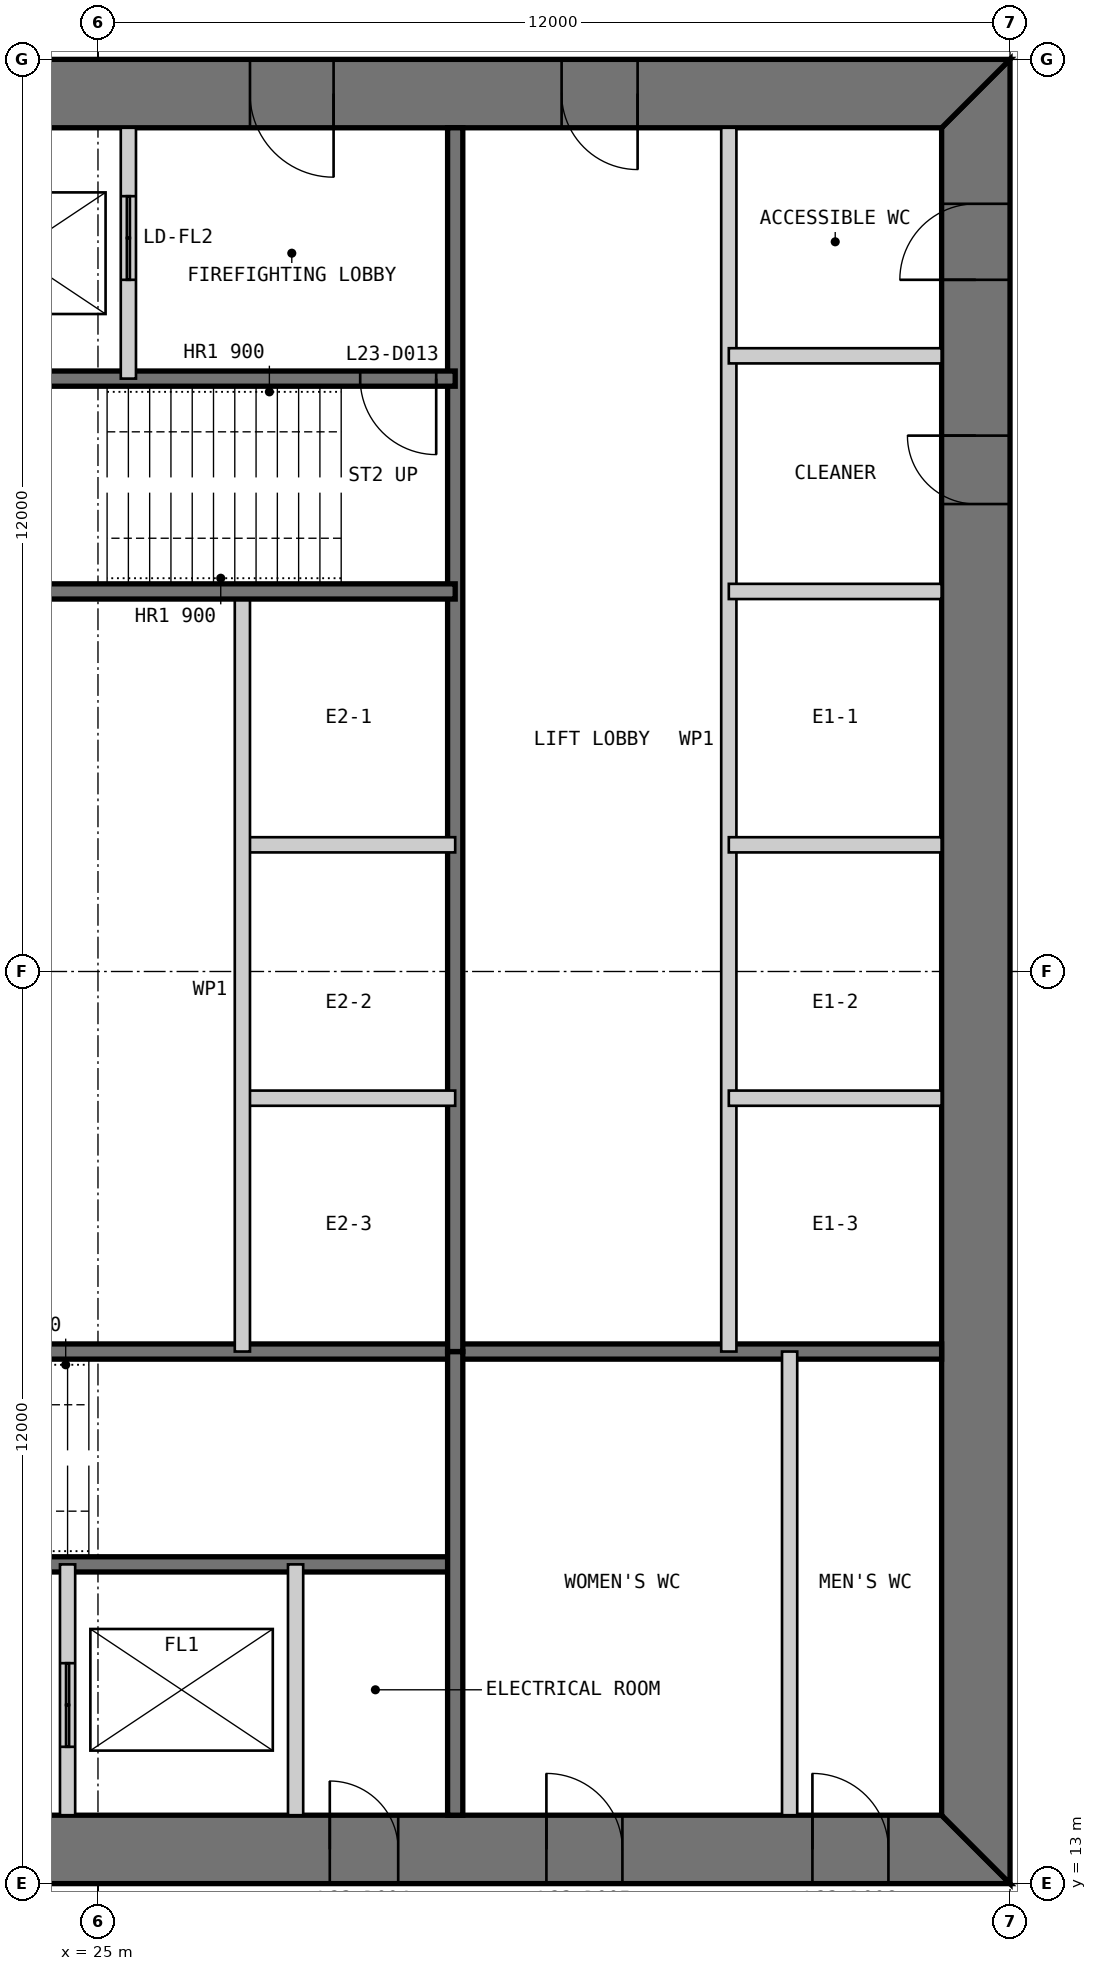
"""IFC4 building model, lengths in metres.
Left out: names, types, materials, properties, quantities, classifications, styles, units other than length and angle.
Written with IfcOpenShell. Run it as: python <this file> out.ifc"""

import sys

from ifc_helpers import new_model, si_unit, direction, frame, frame_2d, origin, place, context, subcontext, project, spatial, polyline, rectangle, outline, extrude, element, fill, save


model = new_model("IFC4")
c1 = context("Model", 3, precision=1e-05, world=origin(), true_north=direction((0.0, 1.0)))
c2 = subcontext(c1, "Body", "Model", "MODEL_VIEW")
j1 = project(units=[si_unit("LENGTHUNIT", "METRE"), si_unit("PLANEANGLEUNIT", "RADIAN")], contexts=[c1])
p1 = place(None, origin())
s1 = spatial("IfcSite", under=j1, at=p1, CompositionType="ELEMENT")
p2 = place(p1, origin())
s2 = spatial("IfcBuilding", under=s1, at=p2, CompositionType="ELEMENT")
p3 = place(p2, frame((0.0, 0.0, 102.4)))
s3 = spatial("IfcBuildingStorey", under=s2, at=p3, CompositionType="ELEMENT", Elevation=102.4)
p4 = place(p3, frame((13.0, 13.45, 0.0), z_axis=(0.0, 0.0, 1.0), x_axis=(1.0, 0.0, 0.0)))
e1 = element("IfcWall", 1, at=p4, inside=s3, PredefinedType="SHEAR", context=c2, shape_type="SweptSolid", body=[
    extrude(outline(polyline([(0.0, -0.45), (24.0, -0.45), (23.1, 0.45), (0.9, 0.45), (0.0, -0.45)])), origin(), (0.0, 0.0, 1.0), 4.0),
])
p5 = place(p4, frame((4.9, 0.0, 0.0)))
e2 = element("IfcOpeningElement", 2, at=p5, cuts=e1, PredefinedType="OPENING", context=c2, shape_type="SweptSolid", body=[
    extrude(rectangle(XDim=1.0, YDim=2.2, at=frame_2d((0.5, 1.1))), frame((0.0, 0.46, 0.0), z_axis=(0.0, -1.0, 0.0), x_axis=(1.0, 0.0, 0.0)), (0.0, 0.0, 1.0), 0.92),
])
p6 = place(p4, frame((8.9, 0.0, 0.0)))
e3 = element("IfcOpeningElement", 3, at=p6, cuts=e1, PredefinedType="OPENING", context=c2, shape_type="SweptSolid", body=[
    extrude(rectangle(XDim=1.1, YDim=2.2, at=frame_2d((0.55, 1.1))), frame((0.0, 0.46, 0.0), z_axis=(0.0, -1.0, 0.0), x_axis=(1.0, 0.0, 0.0)), (0.0, 0.0, 1.0), 0.92),
])
p7 = place(p4, frame((15.05, 0.0, 0.0)))
e4 = element("IfcOpeningElement", 4, at=p7, cuts=e1, PredefinedType="OPENING", context=c2, shape_type="SweptSolid", body=[
    extrude(rectangle(XDim=0.9, YDim=2.2, at=frame_2d((0.45, 1.1))), frame((0.0, 0.46, 0.0), z_axis=(0.0, -1.0, 0.0), x_axis=(1.0, 0.0, 0.0)), (0.0, 0.0, 1.0), 0.92),
])
p8 = place(p4, frame((17.9, 0.0, 0.0)))
e5 = element("IfcOpeningElement", 5, at=p8, cuts=e1, PredefinedType="OPENING", context=c2, shape_type="SweptSolid", body=[
    extrude(rectangle(XDim=1.0, YDim=2.2, at=frame_2d((0.5, 1.1))), frame((0.0, 0.46, 0.0), z_axis=(0.0, -1.0, 0.0), x_axis=(1.0, 0.0, 0.0)), (0.0, 0.0, 1.0), 0.92),
])
p9 = place(p4, frame((21.4, 0.0, 0.0)))
e6 = element("IfcOpeningElement", 6, at=p9, cuts=e1, PredefinedType="OPENING", context=c2, shape_type="SweptSolid", body=[
    extrude(rectangle(XDim=1.0, YDim=2.2, at=frame_2d((0.5, 1.1))), frame((0.0, 0.46, 0.0), z_axis=(0.0, -1.0, 0.0), x_axis=(1.0, 0.0, 0.0)), (0.0, 0.0, 1.0), 0.92),
])
p10 = place(p3, frame((36.55, 13.9, 0.0), z_axis=(0.0, 0.0, 1.0), x_axis=(0.0, 1.0, 0.0)))
e7 = element("IfcWall", 7, at=p10, inside=s3, PredefinedType="SHEAR", context=c2, shape_type="SweptSolid", body=[
    extrude(outline(polyline([(-0.9, -0.45), (23.1, -0.45), (22.2, 0.45), (0.0, 0.45), (-0.9, -0.45)])), origin(), (0.0, 0.0, 1.0), 4.0),
])
p11 = place(p10, frame((20.2, 0.0, 0.0)))
e8 = element("IfcOpeningElement", 8, at=p11, cuts=e7, PredefinedType="OPENING", context=c2, shape_type="SweptSolid", body=[
    extrude(rectangle(XDim=1.0, YDim=2.2, at=frame_2d((0.5, 1.1))), frame((0.0, 0.46, 0.0), z_axis=(0.0, -1.0, 0.0), x_axis=(1.0, 0.0, 0.0)), (0.0, 0.0, 1.0), 0.92),
])
p12 = place(p10, frame((17.25, 0.0, 0.0)))
e9 = element("IfcOpeningElement", 9, at=p12, cuts=e7, PredefinedType="OPENING", context=c2, shape_type="SweptSolid", body=[
    extrude(rectangle(XDim=0.9, YDim=2.2, at=frame_2d((0.45, 1.1))), frame((0.0, 0.46, 0.0), z_axis=(0.0, -1.0, 0.0), x_axis=(1.0, 0.0, 0.0)), (0.0, 0.0, 1.0), 0.92),
])
p13 = place(p3, frame((37.0, 36.55, 0.0), z_axis=(0.0, 0.0, 1.0), x_axis=(-1.0, 0.0, 0.0)))
e10 = element("IfcWall", 10, at=p13, inside=s3, PredefinedType="SHEAR", context=c2, shape_type="SweptSolid", body=[
    extrude(outline(polyline([(0.0, -0.45), (24.0, -0.45), (23.1, 0.45), (0.9, 0.45), (0.0, -0.45)])), origin(), (0.0, 0.0, 1.0), 4.0),
])
p14 = place(p13, frame((4.9, 0.0, 0.0)))
e11 = element("IfcOpeningElement", 11, at=p14, cuts=e10, PredefinedType="OPENING", context=c2, shape_type="SweptSolid", body=[
    extrude(rectangle(XDim=1.0, YDim=2.2, at=frame_2d((0.5, 1.1))), frame((0.0, 0.46, 0.0), z_axis=(0.0, -1.0, 0.0), x_axis=(1.0, 0.0, 0.0)), (0.0, 0.0, 1.0), 0.92),
])
p15 = place(p13, frame((8.9, 0.0, 0.0)))
e12 = element("IfcOpeningElement", 12, at=p15, cuts=e10, PredefinedType="OPENING", context=c2, shape_type="SweptSolid", body=[
    extrude(rectangle(XDim=1.1, YDim=2.2, at=frame_2d((0.55, 1.1))), frame((0.0, 0.46, 0.0), z_axis=(0.0, -1.0, 0.0), x_axis=(1.0, 0.0, 0.0)), (0.0, 0.0, 1.0), 0.92),
])
p16 = place(p13, frame((15.05, 0.0, 0.0)))
e13 = element("IfcOpeningElement", 13, at=p16, cuts=e10, PredefinedType="OPENING", context=c2, shape_type="SweptSolid", body=[
    extrude(rectangle(XDim=0.9, YDim=2.2, at=frame_2d((0.45, 1.1))), frame((0.0, 0.46, 0.0), z_axis=(0.0, -1.0, 0.0), x_axis=(1.0, 0.0, 0.0)), (0.0, 0.0, 1.0), 0.92),
])
p17 = place(p13, frame((17.9, 0.0, 0.0)))
e14 = element("IfcOpeningElement", 14, at=p17, cuts=e10, PredefinedType="OPENING", context=c2, shape_type="SweptSolid", body=[
    extrude(rectangle(XDim=1.0, YDim=2.2, at=frame_2d((0.5, 1.1))), frame((0.0, 0.46, 0.0), z_axis=(0.0, -1.0, 0.0), x_axis=(1.0, 0.0, 0.0)), (0.0, 0.0, 1.0), 0.92),
])
p18 = place(p13, frame((21.4, 0.0, 0.0)))
e15 = element("IfcOpeningElement", 15, at=p18, cuts=e10, PredefinedType="OPENING", context=c2, shape_type="SweptSolid", body=[
    extrude(rectangle(XDim=1.0, YDim=2.2, at=frame_2d((0.5, 1.1))), frame((0.0, 0.46, 0.0), z_axis=(0.0, -1.0, 0.0), x_axis=(1.0, 0.0, 0.0)), (0.0, 0.0, 1.0), 0.92),
])
p19 = place(p3, frame((20.3, 17.2, 0.0), z_axis=(0.0, 0.0, 1.0), x_axis=(1.0, 0.0, 0.0)))
e16 = element("IfcWall", 16, at=p19, inside=s3, PredefinedType="SOLIDWALL", context=c2, shape_type="SweptSolid", body=[
    extrude(rectangle(XDim=9.4, YDim=0.2, at=frame_2d((4.7, 0.0))), origin(), (0.0, 0.0, 1.0), 3.8),
])
p20 = place(p19, frame((0.25, 0.0, 0.0)))
e17 = element("IfcOpeningElement", 17, at=p20, cuts=e16, PredefinedType="OPENING", context=c2, shape_type="SweptSolid", body=[
    extrude(rectangle(XDim=1.0, YDim=2.2, at=frame_2d((0.5, 1.1))), frame((0.0, 0.11, 0.0), z_axis=(0.0, -1.0, 0.0), x_axis=(1.0, 0.0, 0.0)), (0.0, 0.0, 1.0), 0.22),
])
p21 = place(p3, frame((20.3, 20.0, 0.0), z_axis=(0.0, 0.0, 1.0), x_axis=(1.0, 0.0, 0.0)))
e18 = element("IfcWall", 18, at=p21, inside=s3, PredefinedType="SOLIDWALL", context=c2, shape_type="SweptSolid", body=[
    extrude(rectangle(XDim=15.8, YDim=0.2, at=frame_2d((7.9, 0.0))), origin(), (0.0, 0.0, 1.0), 3.8),
])
p22 = place(p3, frame((24.6, 13.9, 0.0), z_axis=(0.0, 0.0, 1.0), x_axis=(0.0, 1.0, 0.0)))
e19 = element("IfcWall", 19, at=p22, inside=s3, PredefinedType="PARTITIONING", context=c2, shape_type="SweptSolid", body=[
    extrude(rectangle(XDim=3.3, YDim=0.2, at=frame_2d((1.65, 0.0))), origin(), (0.0, 0.0, 1.0), 3.8),
])
p23 = place(p22, frame((0.9, 0.0, 0.0)))
e20 = element("IfcOpeningElement", 20, at=p23, cuts=e19, PredefinedType="OPENING", context=c2, shape_type="SweptSolid", body=[
    extrude(rectangle(XDim=1.1, YDim=2.2, at=frame_2d((0.55, 1.1))), frame((0.0, 0.11, 0.0), z_axis=(0.0, -1.0, 0.0), x_axis=(1.0, 0.0, 0.0)), (0.0, 0.0, 1.0), 0.22),
])
p24 = place(p3, frame((27.6, 13.9, 0.0), z_axis=(0.0, 0.0, 1.0), x_axis=(0.0, 1.0, 0.0)))
e21 = element("IfcWall", 21, at=p24, inside=s3, PredefinedType="PARTITIONING", context=c2, shape_type="SweptSolid", body=[
    extrude(rectangle(XDim=3.3, YDim=0.2, at=frame_2d((1.65, 0.0))), origin(), (0.0, 0.0, 1.0), 3.8),
])
p25 = place(p3, frame((29.7, 13.9, 0.0), z_axis=(0.0, 0.0, 1.0), x_axis=(0.0, 1.0, 0.0)))
e22 = element("IfcWall", 22, at=p25, inside=s3, PredefinedType="SOLIDWALL", context=c2, shape_type="SweptSolid", body=[
    extrude(rectangle(XDim=6.1, YDim=0.2, at=frame_2d((3.05, 0.0))), origin(), (0.0, 0.0, 1.0), 3.8),
])
p26 = place(p3, frame((34.1, 13.9, 0.0), z_axis=(0.0, 0.0, 1.0), x_axis=(0.0, 1.0, 0.0)))
e23 = element("IfcWall", 23, at=p26, inside=s3, PredefinedType="PARTITIONING", context=c2, shape_type="SweptSolid", body=[
    extrude(rectangle(XDim=6.1, YDim=0.2, at=frame_2d((3.05, 0.0))), origin(), (0.0, 0.0, 1.0), 3.8),
])
p27 = place(p3, frame((33.3, 36.1, 0.0), z_axis=(0.0, 0.0, 1.0), x_axis=(0.0, -1.0, 0.0)))
e24 = element("IfcWall", 24, at=p27, inside=s3, PredefinedType="PARTITIONING", context=c2, shape_type="SweptSolid", body=[
    extrude(rectangle(XDim=16.1, YDim=0.2, at=frame_2d((8.05, 0.0))), origin(), (0.0, 0.0, 1.0), 3.8),
])
p28 = place(p3, frame((29.7, 36.1, 0.0), z_axis=(0.0, 0.0, 1.0), x_axis=(0.0, -1.0, 0.0)))
e25 = element("IfcWall", 25, at=p28, inside=s3, PredefinedType="SOLIDWALL", context=c2, shape_type="SweptSolid", body=[
    extrude(rectangle(XDim=16.1, YDim=0.2, at=frame_2d((8.05, 0.0))), origin(), (0.0, 0.0, 1.0), 3.8),
])
for number, where, z_axis, x_axis in (
    (26, (36.1, 30.0, 0.0), (0.0, 0.0, 1.0), (-1.0, 0.0, 0.0)),
    (27, (36.1, 26.667, 0.0), (0.0, 0.0, 1.0), (-1.0, 0.0, 0.0)),
    (28, (36.1, 23.333, 0.0), (0.0, 0.0, 1.0), (-1.0, 0.0, 0.0)),
    (29, (29.7, 26.667, 0.0), (0.0, 0.0, 1.0), (-1.0, 0.0, 0.0)),
    (30, (29.7, 23.333, 0.0), (0.0, 0.0, 1.0), (-1.0, 0.0, 0.0)),
):
    element("IfcWall", number, at=place(p3, frame(where, z_axis=z_axis, x_axis=x_axis)), inside=s3, PredefinedType="PARTITIONING", context=c2, shape_type="SweptSolid", body=[
        extrude(rectangle(XDim=2.8, YDim=0.2, at=frame_2d((1.4, 0.0))), origin(), (0.0, 0.0, 1.0), 3.8),
    ])
p29 = place(p3, frame((26.9, 30.0, 0.0), z_axis=(0.0, 0.0, 1.0), x_axis=(0.0, -1.0, 0.0)))
e31 = element("IfcWall", 31, at=p29, inside=s3, PredefinedType="PARTITIONING", context=c2, shape_type="SweptSolid", body=[
    extrude(rectangle(XDim=10.0, YDim=0.2, at=frame_2d((5.0, 0.0))), origin(), (0.0, 0.0, 1.0), 3.8),
])
p30 = place(p3, frame((29.7, 32.8, 0.0), z_axis=(0.0, 0.0, 1.0), x_axis=(-1.0, 0.0, 0.0)))
e32 = element("IfcWall", 32, at=p30, inside=s3, PredefinedType="SOLIDWALL", context=c2, shape_type="SweptSolid", body=[
    extrude(rectangle(XDim=9.4, YDim=0.2, at=frame_2d((4.7, 0.0))), origin(), (0.0, 0.0, 1.0), 3.8),
])
p31 = place(p30, frame((0.25, 0.0, 0.0)))
e33 = element("IfcOpeningElement", 33, at=p31, cuts=e32, PredefinedType="OPENING", context=c2, shape_type="SweptSolid", body=[
    extrude(rectangle(XDim=1.0, YDim=2.2, at=frame_2d((0.5, 1.1))), frame((0.0, 0.11, 0.0), z_axis=(0.0, -1.0, 0.0), x_axis=(1.0, 0.0, 0.0)), (0.0, 0.0, 1.0), 0.22),
])
p32 = place(p3, frame((29.7, 30.0, 0.0), z_axis=(0.0, 0.0, 1.0), x_axis=(-1.0, 0.0, 0.0)))
e34 = element("IfcWall", 34, at=p32, inside=s3, PredefinedType="SOLIDWALL", context=c2, shape_type="SweptSolid", body=[
    extrude(rectangle(XDim=15.8, YDim=0.2, at=frame_2d((7.9, 0.0))), origin(), (0.0, 0.0, 1.0), 3.8),
])
p33 = place(p3, frame((25.4, 36.1, 0.0), z_axis=(0.0, 0.0, 1.0), x_axis=(0.0, -1.0, 0.0)))
e35 = element("IfcWall", 35, at=p33, inside=s3, PredefinedType="PARTITIONING", context=c2, shape_type="SweptSolid", body=[
    extrude(rectangle(XDim=3.3, YDim=0.2, at=frame_2d((1.65, 0.0))), origin(), (0.0, 0.0, 1.0), 3.8),
])
p34 = place(p33, frame((0.9, 0.0, 0.0)))
e36 = element("IfcOpeningElement", 36, at=p34, cuts=e35, PredefinedType="OPENING", context=c2, shape_type="SweptSolid", body=[
    extrude(rectangle(XDim=1.1, YDim=2.2, at=frame_2d((0.55, 1.1))), frame((0.0, 0.11, 0.0), z_axis=(0.0, -1.0, 0.0), x_axis=(1.0, 0.0, 0.0)), (0.0, 0.0, 1.0), 0.22),
])
p35 = place(p3, frame((36.1, 33.1, 0.0), z_axis=(0.0, 0.0, 1.0), x_axis=(-1.0, 0.0, 0.0)))
e37 = element("IfcWall", 37, at=p35, inside=s3, PredefinedType="PARTITIONING", context=c2, shape_type="SweptSolid", body=[
    extrude(rectangle(XDim=2.8, YDim=0.2, at=frame_2d((1.4, 0.0))), origin(), (0.0, 0.0, 1.0), 3.8),
])
p36 = place(p7, origin())
e38 = element("IfcDoor", 38, at=p36, inside=s3, OperationType="SINGLE_SWING_LEFT", PredefinedType="DOOR", context=c2, shape_type="SweptSolid", body=[
    extrude(rectangle(XDim=0.9, YDim=2.2, at=frame_2d((0.45, 1.1))), frame((0.0, 0.025, 0.0), z_axis=(0.0, -1.0, 0.0), x_axis=(1.0, 0.0, 0.0)), (0.0, 0.0, 1.0), 0.05),
    extrude(outline(polyline([(0.0, 0.0), (0.04, 0.0), (0.04, 2.16), (0.86, 2.16), (0.86, 0.0), (0.9, 0.0), (0.9, 2.2), (0.0, 2.2), (0.0, 0.0)])), frame((0.0, 0.3, 0.0), z_axis=(0.0, -1.0, 0.0), x_axis=(1.0, 0.0, 0.0)), (0.0, 0.0, 1.0), 0.6),
])
fill(e4, e38)
p37 = place(p8, origin())
e39 = element("IfcDoor", 39, at=p37, inside=s3, OperationType="SINGLE_SWING_LEFT", PredefinedType="DOOR", context=c2, shape_type="SweptSolid", body=[
    extrude(rectangle(XDim=1.0, YDim=2.2, at=frame_2d((0.5, 1.1))), frame((0.0, 0.025, 0.0), z_axis=(0.0, -1.0, 0.0), x_axis=(1.0, 0.0, 0.0)), (0.0, 0.0, 1.0), 0.05),
    extrude(outline(polyline([(0.0, 0.0), (0.04, 0.0), (0.04, 2.16), (0.96, 2.16), (0.96, 0.0), (1.0, 0.0), (1.0, 2.2), (0.0, 2.2), (0.0, 0.0)])), frame((0.0, 0.3, 0.0), z_axis=(0.0, -1.0, 0.0), x_axis=(1.0, 0.0, 0.0)), (0.0, 0.0, 1.0), 0.6),
])
fill(e5, e39)
p38 = place(p9, origin())
e40 = element("IfcDoor", 40, at=p38, inside=s3, OperationType="SINGLE_SWING_LEFT", PredefinedType="DOOR", context=c2, shape_type="SweptSolid", body=[
    extrude(rectangle(XDim=1.0, YDim=2.2, at=frame_2d((0.5, 1.1))), frame((0.0, 0.025, 0.0), z_axis=(0.0, -1.0, 0.0), x_axis=(1.0, 0.0, 0.0)), (0.0, 0.0, 1.0), 0.05),
    extrude(outline(polyline([(0.0, 0.0), (0.04, 0.0), (0.04, 2.16), (0.96, 2.16), (0.96, 0.0), (1.0, 0.0), (1.0, 2.2), (0.0, 2.2), (0.0, 0.0)])), frame((0.0, 0.3, 0.0), z_axis=(0.0, -1.0, 0.0), x_axis=(1.0, 0.0, 0.0)), (0.0, 0.0, 1.0), 0.6),
])
fill(e6, e40)
p39 = place(p14, origin())
e41 = element("IfcDoor", 41, at=p39, inside=s3, OperationType="SINGLE_SWING_LEFT", PredefinedType="DOOR", context=c2, shape_type="SweptSolid", body=[
    extrude(rectangle(XDim=1.0, YDim=2.2, at=frame_2d((0.5, 1.1))), frame((0.0, 0.025, 0.0), z_axis=(0.0, -1.0, 0.0), x_axis=(1.0, 0.0, 0.0)), (0.0, 0.0, 1.0), 0.05),
    extrude(outline(polyline([(0.0, 0.0), (0.04, 0.0), (0.04, 2.16), (0.96, 2.16), (0.96, 0.0), (1.0, 0.0), (1.0, 2.2), (0.0, 2.2), (0.0, 0.0)])), frame((0.0, 0.3, 0.0), z_axis=(0.0, -1.0, 0.0), x_axis=(1.0, 0.0, 0.0)), (0.0, 0.0, 1.0), 0.6),
])
fill(e11, e41)
p40 = place(p15, origin())
e42 = element("IfcDoor", 42, at=p40, inside=s3, OperationType="SINGLE_SWING_LEFT", PredefinedType="DOOR", context=c2, shape_type="SweptSolid", body=[
    extrude(rectangle(XDim=1.1, YDim=2.2, at=frame_2d((0.55, 1.1))), frame((0.0, 0.025, 0.0), z_axis=(0.0, -1.0, 0.0), x_axis=(1.0, 0.0, 0.0)), (0.0, 0.0, 1.0), 0.05),
    extrude(outline(polyline([(0.0, 0.0), (0.04, 0.0), (0.04, 2.16), (1.06, 2.16), (1.06, 0.0), (1.1, 0.0), (1.1, 2.2), (0.0, 2.2), (0.0, 0.0)])), frame((0.0, 0.3, 0.0), z_axis=(0.0, -1.0, 0.0), x_axis=(1.0, 0.0, 0.0)), (0.0, 0.0, 1.0), 0.6),
])
fill(e12, e42)
p41 = place(p31, origin())
e43 = element("IfcDoor", 43, at=p41, inside=s3, OperationType="SINGLE_SWING_LEFT", PredefinedType="DOOR", context=c2, shape_type="SweptSolid", body=[
    extrude(rectangle(XDim=1.0, YDim=2.2, at=frame_2d((0.5, 1.1))), frame((0.0, 0.025, 0.0), z_axis=(0.0, -1.0, 0.0), x_axis=(1.0, 0.0, 0.0)), (0.0, 0.0, 1.0), 0.05),
])
fill(e33, e43)
p42 = place(p11, origin())
e44 = element("IfcDoor", 44, at=p42, inside=s3, OperationType="SINGLE_SWING_LEFT", PredefinedType="DOOR", context=c2, shape_type="SweptSolid", body=[
    extrude(rectangle(XDim=1.0, YDim=2.2, at=frame_2d((0.5, 1.1))), frame((0.0, 0.025, 0.0), z_axis=(0.0, -1.0, 0.0), x_axis=(1.0, 0.0, 0.0)), (0.0, 0.0, 1.0), 0.05),
    extrude(outline(polyline([(0.0, 0.0), (0.04, 0.0), (0.04, 2.16), (0.96, 2.16), (0.96, 0.0), (1.0, 0.0), (1.0, 2.2), (0.0, 2.2), (0.0, 0.0)])), frame((0.0, 0.3, 0.0), z_axis=(0.0, -1.0, 0.0), x_axis=(1.0, 0.0, 0.0)), (0.0, 0.0, 1.0), 0.6),
])
fill(e8, e44)
p43 = place(p12, origin())
e45 = element("IfcDoor", 45, at=p43, inside=s3, OperationType="SINGLE_SWING_RIGHT", PredefinedType="DOOR", context=c2, shape_type="SweptSolid", body=[
    extrude(rectangle(XDim=0.9, YDim=2.2, at=frame_2d((0.45, 1.1))), frame((0.0, 0.025, 0.0), z_axis=(0.0, -1.0, 0.0), x_axis=(1.0, 0.0, 0.0)), (0.0, 0.0, 1.0), 0.05),
    extrude(outline(polyline([(0.0, 0.0), (0.04, 0.0), (0.04, 2.16), (0.86, 2.16), (0.86, 0.0), (0.9, 0.0), (0.9, 2.2), (0.0, 2.2), (0.0, 0.0)])), frame((0.0, 0.3, 0.0), z_axis=(0.0, -1.0, 0.0), x_axis=(1.0, 0.0, 0.0)), (0.0, 0.0, 1.0), 0.6),
])
fill(e9, e45)
p44 = place(p23, origin())
e46 = element("IfcDoor", 46, at=p44, inside=s3, OperationType="DOUBLE_DOOR_SLIDING", PredefinedType="DOOR", context=c2, shape_type="SweptSolid", body=[
    extrude(rectangle(XDim=1.1, YDim=2.2, at=frame_2d((0.55, 1.1))), frame((0.0, 0.025, 0.0), z_axis=(0.0, -1.0, 0.0), x_axis=(1.0, 0.0, 0.0)), (0.0, 0.0, 1.0), 0.05),
])
fill(e20, e46)
p45 = place(p34, origin())
e47 = element("IfcDoor", 47, at=p45, inside=s3, OperationType="DOUBLE_DOOR_SLIDING", PredefinedType="DOOR", context=c2, shape_type="SweptSolid", body=[
    extrude(rectangle(XDim=1.1, YDim=2.2, at=frame_2d((0.55, 1.1))), frame((0.0, 0.025, 0.0), z_axis=(0.0, -1.0, 0.0), x_axis=(1.0, 0.0, 0.0)), (0.0, 0.0, 1.0), 0.05),
])
fill(e36, e47)
save(model, sys.argv[1])
